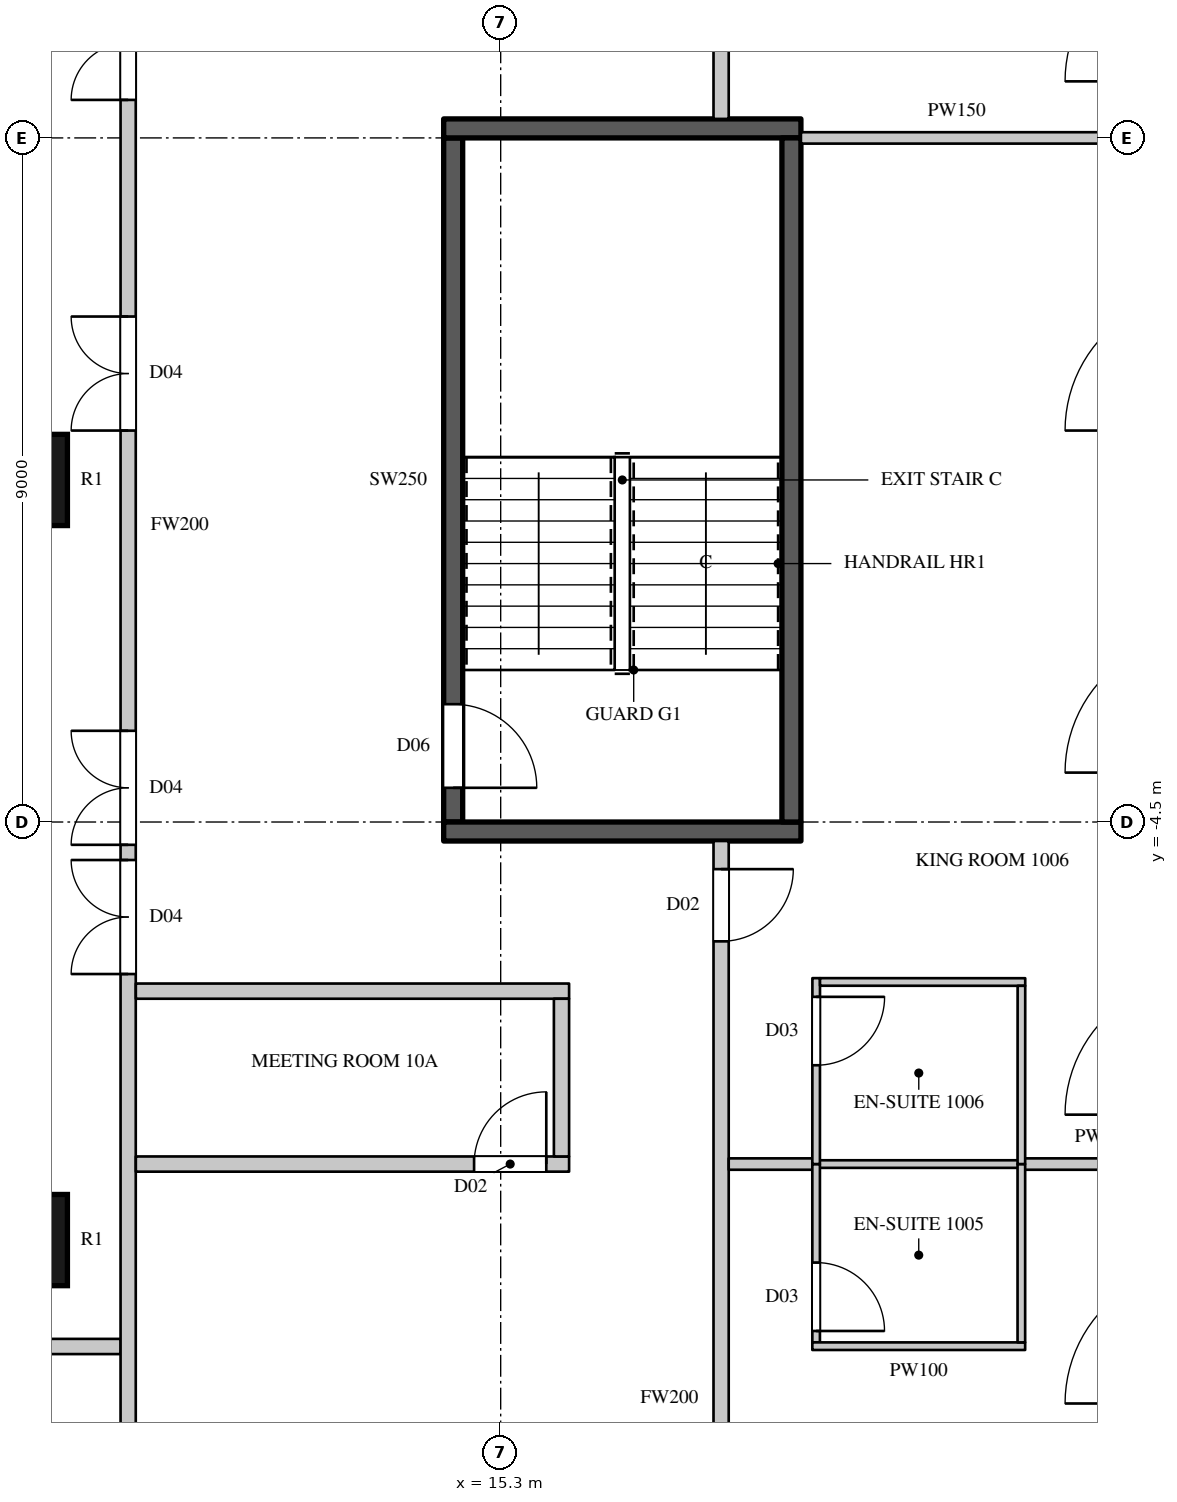
"""IFC4 building model, lengths in metres.
Left out: names, types, materials, properties, quantities, classifications, styles, units other than length and angle.
Written with IfcOpenShell. Run it as: python <this file> out.ifc"""

import sys

from ifc_helpers import new_model, si_unit, direction, frame, frame_2d, origin, origin_2d, place, context, subcontext, project, spatial, rectangle, circle, extrude, element, fill, save


model = new_model("IFC4")
c1 = context("Model", 3, precision=1e-05, world=origin(), true_north=direction((0.0, 1.0)))
c2 = subcontext(c1, "Body", "Model", "MODEL_VIEW")
j1 = project(units=[si_unit("LENGTHUNIT", "METRE"), si_unit("PLANEANGLEUNIT", "RADIAN")], contexts=[c1])
p1 = place(None, origin())
s1 = spatial("IfcSite", under=j1, at=p1, CompositionType="ELEMENT")
p2 = place(p1, origin())
s2 = spatial("IfcBuilding", under=s1, at=p2, CompositionType="ELEMENT")
p3 = place(p2, frame((0.0, 0.0, 66.3)))
s3 = spatial("IfcBuildingStorey", under=s2, at=p3, CompositionType="ELEMENT", Elevation=66.3)
for number, where, z_axis, x_axis in (
    (1, (9.0, -10.0, 0.0), (0.0, 0.0, 1.0), (1.0, 0.0, 0.0)),
    (2, (9.0, 0.0, 0.0), (0.0, 0.0, 1.0), (1.0, 0.0, 0.0)),
):
    element("IfcColumn", number, at=place(p3, frame(where, z_axis=z_axis, x_axis=x_axis)), inside=s3, PredefinedType="COLUMN", context=c2, shape_type="SweptSolid", body=[
        extrude(circle(Radius=0.6, at=origin_2d()), origin(), (0.0, 0.0, 1.0), 3.6),
    ])
p4 = place(p3, frame((-8.3, -11.4, 0.0), z_axis=(0.0, 0.0, 1.0), x_axis=(1.0, 0.0, 0.0)))
e3 = element("IfcWall", 3, at=p4, inside=s3, PredefinedType="PARTITIONING", context=c2, shape_type="SweptSolid", body=[
    extrude(rectangle(XDim=18.6, YDim=0.2, at=frame_2d((9.3, 0.0))), origin(), (0.0, 0.0, 1.0), 3.3),
])
p5 = place(p4, frame((3.7, 0.0, 0.0)))
e4 = element("IfcOpeningElement", 4, at=p5, cuts=e3, PredefinedType="OPENING", context=c2, shape_type="SweptSolid", body=[
    extrude(rectangle(XDim=1.5, YDim=2.2, at=frame_2d((0.75, 1.1))), frame((0.0, 0.11, 0.0), z_axis=(0.0, -1.0, 0.0), x_axis=(1.0, 0.0, 0.0)), (0.0, 0.0, 1.0), 0.22),
])
p6 = place(p3, frame((10.399, -12.5, 0.0), z_axis=(0.0, 0.0, 1.0), x_axis=(0.0, 1.0, 0.0)))
e5 = element("IfcWall", 5, at=p6, inside=s3, PredefinedType="PARTITIONING", context=c2, shape_type="SweptSolid", body=[
    extrude(rectangle(XDim=23.8, YDim=0.2, at=frame_2d((11.9, 0.0))), origin(), (0.0, 0.0, 1.0), 3.3),
])
p7 = place(p6, frame((6.0, 0.0, 0.0)))
e6 = element("IfcOpeningElement", 6, at=p7, cuts=e5, PredefinedType="OPENING", context=c2, shape_type="SweptSolid", body=[
    extrude(rectangle(XDim=1.5, YDim=2.2, at=frame_2d((0.75, 1.1))), frame((0.0, 0.11, 0.0), z_axis=(0.0, -1.0, 0.0), x_axis=(1.0, 0.0, 0.0)), (0.0, 0.0, 1.0), 0.22),
])
p8 = place(p6, frame((17.5, 0.0, 0.0)))
e7 = element("IfcOpeningElement", 7, at=p8, cuts=e5, PredefinedType="OPENING", context=c2, shape_type="SweptSolid", body=[
    extrude(rectangle(XDim=1.5, YDim=2.2, at=frame_2d((0.75, 1.1))), frame((0.0, 0.11, 0.0), z_axis=(0.0, -1.0, 0.0), x_axis=(1.0, 0.0, 0.0)), (0.0, 0.0, 1.0), 0.22),
])
p9 = place(p6, frame((7.7, 0.0, 0.0)))
e8 = element("IfcOpeningElement", 8, at=p9, cuts=e5, PredefinedType="OPENING", context=c2, shape_type="SweptSolid", body=[
    extrude(rectangle(XDim=1.5, YDim=2.2, at=frame_2d((0.75, 1.1))), frame((0.0, 0.11, 0.0), z_axis=(0.0, -1.0, 0.0), x_axis=(1.0, 0.0, 0.0)), (0.0, 0.0, 1.0), 0.22),
])
p10 = place(p6, frame((13.15, 0.0, 0.0)))
e9 = element("IfcOpeningElement", 9, at=p10, cuts=e5, PredefinedType="OPENING", context=c2, shape_type="SweptSolid", body=[
    extrude(rectangle(XDim=1.5, YDim=2.2, at=frame_2d((0.75, 1.1))), frame((0.0, 0.11, 0.0), z_axis=(0.0, -1.0, 0.0), x_axis=(1.0, 0.0, 0.0)), (0.0, 0.0, 1.0), 0.22),
])
p11 = place(p3, frame((10.5, -9.0, 0.0), z_axis=(0.0, 0.0, 1.0), x_axis=(1.0, 0.0, 0.0)))
e10 = element("IfcWall", 10, at=p11, inside=s3, PredefinedType="PARTITIONING", context=c2, shape_type="SweptSolid", body=[
    extrude(rectangle(XDim=5.7, YDim=0.2, at=frame_2d((2.85, 0.0))), origin(), (0.0, 0.0, 1.0), 2.65),
])
p12 = place(p11, frame((4.45, 0.0, 0.0)))
e11 = element("IfcOpeningElement", 11, at=p12, cuts=e10, PredefinedType="OPENING", context=c2, shape_type="SweptSolid", body=[
    extrude(rectangle(XDim=0.95, YDim=2.2, at=frame_2d((0.475, 1.1))), frame((0.0, 0.11, 0.0), z_axis=(0.0, -1.0, 0.0), x_axis=(1.0, 0.0, 0.0)), (0.0, 0.0, 1.0), 0.22),
])
p13 = place(p3, frame((10.5, -6.725, 0.0), z_axis=(0.0, 0.0, 1.0), x_axis=(1.0, 0.0, 0.0)))
e12 = element("IfcWall", 12, at=p13, inside=s3, PredefinedType="PARTITIONING", context=c2, shape_type="SweptSolid", body=[
    extrude(rectangle(XDim=5.7, YDim=0.2, at=frame_2d((2.85, 0.0))), origin(), (0.0, 0.0, 1.0), 3.3),
])
p14 = place(p3, frame((16.1, -8.9, 0.0), z_axis=(0.0, 0.0, 1.0), x_axis=(0.0, 1.0, 0.0)))
e13 = element("IfcWall", 13, at=p14, inside=s3, PredefinedType="PARTITIONING", context=c2, shape_type="SweptSolid", body=[
    extrude(rectangle(XDim=2.075, YDim=0.2, at=frame_2d((1.038, 0.0))), origin(), (0.0, 0.0, 1.0), 3.3),
])
p15 = place(p3, frame((18.2, -19.42, 0.0), z_axis=(0.0, 0.0, 1.0), x_axis=(0.0, 1.0, 0.0)))
e14 = element("IfcWall", 14, at=p15, inside=s3, PredefinedType="PARTITIONING", context=c2, shape_type="SweptSolid", body=[
    extrude(rectangle(XDim=14.67, YDim=0.2, at=frame_2d((7.335, 0.0))), origin(), (0.0, 0.0, 1.0), 3.3),
])
p16 = place(p15, frame((3.95, 0.0, 0.0)))
e15 = element("IfcOpeningElement", 15, at=p16, cuts=e14, PredefinedType="OPENING", context=c2, shape_type="SweptSolid", body=[
    extrude(rectangle(XDim=0.95, YDim=2.2, at=frame_2d((0.475, 1.1))), frame((0.0, 0.11, 0.0), z_axis=(0.0, -1.0, 0.0), x_axis=(1.0, 0.0, 0.0)), (0.0, 0.0, 1.0), 0.22),
])
p17 = place(p15, frame((13.35, 0.0, 0.0)))
e16 = element("IfcOpeningElement", 16, at=p17, cuts=e14, PredefinedType="OPENING", context=c2, shape_type="SweptSolid", body=[
    extrude(rectangle(XDim=0.95, YDim=2.2, at=frame_2d((0.475, 1.1))), frame((0.0, 0.11, 0.0), z_axis=(0.0, -1.0, 0.0), x_axis=(1.0, 0.0, 0.0)), (0.0, 0.0, 1.0), 0.22),
])
p18 = place(p3, frame((18.2, 4.75, 0.0), z_axis=(0.0, 0.0, 1.0), x_axis=(0.0, 1.0, 0.0)))
e17 = element("IfcWall", 17, at=p18, inside=s3, PredefinedType="PARTITIONING", context=c2, shape_type="SweptSolid", body=[
    extrude(rectangle(XDim=14.134, YDim=0.2, at=frame_2d((7.067, 0.0))), origin(), (0.0, 0.0, 1.0), 3.3),
])
p19 = place(p18, frame((1.7, 0.0, 0.0)))
e18 = element("IfcOpeningElement", 18, at=p19, cuts=e17, PredefinedType="OPENING", context=c2, shape_type="SweptSolid", body=[
    extrude(rectangle(XDim=0.9, YDim=2.2, at=frame_2d((0.45, 1.1))), frame((0.0, 0.11, 0.0), z_axis=(0.0, -1.0, 0.0), x_axis=(1.0, 0.0, 0.0)), (0.0, 0.0, 1.0), 0.22),
])
p20 = place(p3, frame((18.3, -9.0, 0.0), z_axis=(0.0, 0.0, 1.0), x_axis=(1.0, 0.0, 0.0)))
e19 = element("IfcWall", 19, at=p20, inside=s3, PredefinedType="PARTITIONING", context=c2, shape_type="SweptSolid", body=[
    extrude(rectangle(XDim=1.13, YDim=0.15, at=frame_2d((0.565, 0.0))), origin(), (0.0, 0.0, 1.0), 2.65),
])
p21 = place(p3, frame((19.25, 4.5, 0.0), z_axis=(0.0, 0.0, 1.0), x_axis=(1.0, 0.0, 0.0)))
e20 = element("IfcWall", 20, at=p21, inside=s3, PredefinedType="PARTITIONING", context=c2, shape_type="SweptSolid", body=[
    extrude(rectangle(XDim=4.1, YDim=0.15, at=frame_2d((2.05, 0.0))), origin(), (0.0, 0.0, 1.0), 3.3),
])
p22 = place(p3, frame((22.17, -9.0, 0.0), z_axis=(0.0, 0.0, 1.0), x_axis=(1.0, 0.0, 0.0)))
e21 = element("IfcWall", 21, at=p22, inside=s3, PredefinedType="PARTITIONING", context=c2, shape_type="SweptSolid", body=[
    extrude(rectangle(XDim=2.13, YDim=0.15, at=frame_2d((1.065, 0.0))), origin(), (0.0, 0.0, 1.0), 2.65),
])
p23 = place(p3, frame((14.675, -4.5, 0.0), z_axis=(0.0, 0.0, 1.0), x_axis=(0.0, 1.0, 0.0)))
e22 = element("IfcWall", 22, at=p23, inside=s3, PredefinedType="SHEAR", context=c2, shape_type="SweptSolid", body=[
    extrude(rectangle(XDim=9.0, YDim=0.25, at=frame_2d((4.5, 0.0))), origin(), (0.0, 0.0, 1.0), 3.3),
])
p24 = place(p23, frame((0.45, 0.0, 0.0)))
e23 = element("IfcOpeningElement", 23, at=p24, cuts=e22, PredefinedType="OPENING", context=c2, shape_type="SweptSolid", body=[
    extrude(rectangle(XDim=1.1, YDim=2.2, at=frame_2d((0.55, 1.1))), frame((0.0, 0.135, 0.0), z_axis=(0.0, -1.0, 0.0), x_axis=(1.0, 0.0, 0.0)), (0.0, 0.0, 1.0), 0.27),
])
for number, where, z_axis, x_axis in (
    (24, (14.55, -4.625, 0.0), (0.0, 0.0, 1.0), (1.0, 0.0, 0.0)),
    (25, (14.55, 4.625, 0.0), (0.0, 0.0, 1.0), (1.0, 0.0, 0.0)),
):
    element("IfcWall", number, at=place(p3, frame(where, z_axis=z_axis, x_axis=x_axis)), inside=s3, PredefinedType="SHEAR", context=c2, shape_type="SweptSolid", body=[
        extrude(rectangle(XDim=4.7, YDim=0.25, at=frame_2d((2.35, 0.0))), origin(), (0.0, 0.0, 1.0), 3.3),
    ])
p25 = place(p3, frame((19.125, -4.5, 0.0), z_axis=(0.0, 0.0, 1.0), x_axis=(0.0, 1.0, 0.0)))
e26 = element("IfcWall", 26, at=p25, inside=s3, PredefinedType="SHEAR", context=c2, shape_type="SweptSolid", body=[
    extrude(rectangle(XDim=9.0, YDim=0.25, at=frame_2d((4.5, 0.0))), origin(), (0.0, 0.0, 1.0), 3.3),
])
p26 = place(p3, frame((19.43, -9.0, 0.0), z_axis=(0.0, 0.0, 1.0), x_axis=(1.0, 0.0, 0.0)))
e27 = element("IfcWall", 27, at=p26, inside=s3, PredefinedType="PARTITIONING", context=c2, shape_type="SweptSolid", body=[
    extrude(rectangle(XDim=2.74, YDim=0.1, at=frame_2d((1.37, 0.0))), origin(), (0.0, 0.0, 1.0), 2.65),
])
p27 = place(p3, frame((19.45, -11.346, 0.0), z_axis=(0.0, 0.0, 1.0), x_axis=(0.0, 1.0, 0.0)))
e28 = element("IfcWall", 28, at=p27, inside=s3, PredefinedType="PARTITIONING", context=c2, shape_type="SweptSolid", body=[
    extrude(rectangle(XDim=2.346, YDim=0.1, at=frame_2d((1.173, 0.0))), origin(), (0.0, 0.0, 1.0), 3.3),
])
p28 = place(p27, frame((0.15, 0.0, 0.0)))
e29 = element("IfcOpeningElement", 29, at=p28, cuts=e28, PredefinedType="OPENING", context=c2, shape_type="SweptSolid", body=[
    extrude(rectangle(XDim=0.9, YDim=2.2, at=frame_2d((0.45, 1.1))), frame((0.0, 0.06, 0.0), z_axis=(0.0, -1.0, 0.0), x_axis=(1.0, 0.0, 0.0)), (0.0, 0.0, 1.0), 0.12),
])
p29 = place(p3, frame((19.4, -11.396, 0.0), z_axis=(0.0, 0.0, 1.0), x_axis=(1.0, 0.0, 0.0)))
e30 = element("IfcWall", 30, at=p29, inside=s3, PredefinedType="PARTITIONING", context=c2, shape_type="SweptSolid", body=[
    extrude(rectangle(XDim=2.8, YDim=0.1, at=frame_2d((1.4, 0.0))), origin(), (0.0, 0.0, 1.0), 3.3),
])
p30 = place(p3, frame((19.45, -9.0, 0.0), z_axis=(0.0, 0.0, 1.0), x_axis=(0.000399241409, 0.999999920303, 0.0)))
e31 = element("IfcWall", 31, at=p30, inside=s3, PredefinedType="PARTITIONING", context=c2, shape_type="SweptSolid", body=[
    extrude(rectangle(XDim=2.446, YDim=0.1, at=frame_2d((1.223, 0.0))), origin(), (0.0, 0.0, 1.0), 3.3),
])
p31 = place(p30, frame((1.3, 0.0, 0.0)))
e32 = element("IfcOpeningElement", 32, at=p31, cuts=e31, PredefinedType="OPENING", context=c2, shape_type="SweptSolid", body=[
    extrude(rectangle(XDim=0.9, YDim=2.2, at=frame_2d((0.45, 1.1))), frame((0.0, 0.06, 0.0), z_axis=(0.0, -1.0, 0.0), x_axis=(1.0, 0.0, 0.0)), (0.0, 0.0, 1.0), 0.12),
])
p32 = place(p3, frame((19.501, -6.604, 0.0), z_axis=(0.0, 0.0, 1.0), x_axis=(0.999999934588, -0.000361696332, 0.0)))
e33 = element("IfcWall", 33, at=p32, inside=s3, PredefinedType="PARTITIONING", context=c2, shape_type="SweptSolid", body=[
    extrude(rectangle(XDim=2.7, YDim=0.1, at=frame_2d((1.35, 0.0))), origin(), (0.0, 0.0, 1.0), 3.3),
])
p33 = place(p3, frame((22.15, -11.346, 0.0), z_axis=(0.0, 0.0, 1.0), x_axis=(0.0, 1.0, 0.0)))
e34 = element("IfcWall", 34, at=p33, inside=s3, PredefinedType="PARTITIONING", context=c2, shape_type="SweptSolid", body=[
    extrude(rectangle(XDim=2.346, YDim=0.1, at=frame_2d((1.173, 0.0))), origin(), (0.0, 0.0, 1.0), 3.3),
])
p34 = place(p3, frame((22.15, -9.0, 0.0), z_axis=(0.0, 0.0, 1.0), x_axis=(0.00041644973, 0.999999913285, 0.0)))
e35 = element("IfcWall", 35, at=p34, inside=s3, PredefinedType="PARTITIONING", context=c2, shape_type="SweptSolid", body=[
    extrude(rectangle(XDim=2.345, YDim=0.1, at=frame_2d((1.172, 0.0))), origin(), (0.0, 0.0, 1.0), 3.3),
])
p35 = place(p7, origin())
e36 = element("IfcDoor", 36, at=p35, inside=s3, OperationType="DOUBLE_DOOR_SINGLE_SWING", PredefinedType="DOOR", context=c2, shape_type="SweptSolid", body=[
    extrude(rectangle(XDim=1.5, YDim=2.2, at=frame_2d((0.75, 1.1))), frame((0.0, 0.025, 0.0), z_axis=(0.0, -1.0, 0.0), x_axis=(1.0, 0.0, 0.0)), (0.0, 0.0, 1.0), 0.05),
])
fill(e6, e36)
p36 = place(p8, origin())
e37 = element("IfcDoor", 37, at=p36, inside=s3, OperationType="DOUBLE_DOOR_SINGLE_SWING", PredefinedType="DOOR", context=c2, shape_type="SweptSolid", body=[
    extrude(rectangle(XDim=1.5, YDim=2.2, at=frame_2d((0.75, 1.1))), frame((0.0, 0.025, 0.0), z_axis=(0.0, -1.0, 0.0), x_axis=(1.0, 0.0, 0.0)), (0.0, 0.0, 1.0), 0.05),
])
fill(e7, e37)
p37 = place(p9, origin())
e38 = element("IfcDoor", 38, at=p37, inside=s3, OperationType="DOUBLE_DOOR_SINGLE_SWING", PredefinedType="DOOR", context=c2, shape_type="SweptSolid", body=[
    extrude(rectangle(XDim=1.5, YDim=2.2, at=frame_2d((0.75, 1.1))), frame((0.0, 0.025, 0.0), z_axis=(0.0, -1.0, 0.0), x_axis=(1.0, 0.0, 0.0)), (0.0, 0.0, 1.0), 0.05),
])
fill(e8, e38)
p38 = place(p10, origin())
e39 = element("IfcDoor", 39, at=p38, inside=s3, OperationType="DOUBLE_DOOR_SINGLE_SWING", PredefinedType="DOOR", context=c2, shape_type="SweptSolid", body=[
    extrude(rectangle(XDim=1.5, YDim=2.2, at=frame_2d((0.75, 1.1))), frame((0.0, 0.025, 0.0), z_axis=(0.0, -1.0, 0.0), x_axis=(1.0, 0.0, 0.0)), (0.0, 0.0, 1.0), 0.05),
])
fill(e9, e39)
p39 = place(p12, origin())
e40 = element("IfcDoor", 40, at=p39, inside=s3, OperationType="SINGLE_SWING_RIGHT", PredefinedType="DOOR", context=c2, shape_type="SweptSolid", body=[
    extrude(rectangle(XDim=0.95, YDim=2.2, at=frame_2d((0.475, 1.1))), frame((0.0, 0.025, 0.0), z_axis=(0.0, -1.0, 0.0), x_axis=(1.0, 0.0, 0.0)), (0.0, 0.0, 1.0), 0.05),
])
fill(e11, e40)
p40 = place(p28, origin())
e41 = element("IfcDoor", 41, at=p40, inside=s3, OperationType="SINGLE_SWING_RIGHT", PredefinedType="DOOR", context=c2, shape_type="SweptSolid", body=[
    extrude(rectangle(XDim=0.9, YDim=2.2, at=frame_2d((0.45, 1.1))), frame((0.0, 0.025, 0.0), z_axis=(0.0, -1.0, 0.0), x_axis=(1.0, 0.0, 0.0)), (0.0, 0.0, 1.0), 0.05),
])
fill(e29, e41)
p41 = place(p17, origin())
e42 = element("IfcDoor", 42, at=p41, inside=s3, OperationType="SINGLE_SWING_LEFT", PredefinedType="DOOR", context=c2, shape_type="SweptSolid", body=[
    extrude(rectangle(XDim=0.95, YDim=2.2, at=frame_2d((0.475, 1.1))), frame((0.0, 0.025, 0.0), z_axis=(0.0, -1.0, 0.0), x_axis=(1.0, 0.0, 0.0)), (0.0, 0.0, 1.0), 0.05),
])
fill(e16, e42)
p42 = place(p31, origin())
e43 = element("IfcDoor", 43, at=p42, inside=s3, OperationType="SINGLE_SWING_LEFT", PredefinedType="DOOR", context=c2, shape_type="SweptSolid", body=[
    extrude(rectangle(XDim=0.9, YDim=2.2, at=frame_2d((0.45, 1.1))), frame((0.0, 0.025, 0.0), z_axis=(0.0, -1.0, 0.0), x_axis=(1.0, 0.0, 0.0)), (0.0, 0.0, 1.0), 0.05),
])
fill(e32, e43)
p43 = place(p24, origin())
e44 = element("IfcDoor", 44, at=p43, inside=s3, OperationType="SINGLE_SWING_RIGHT", PredefinedType="DOOR", context=c2, shape_type="SweptSolid", body=[
    extrude(rectangle(XDim=1.1, YDim=2.2, at=frame_2d((0.55, 1.1))), frame((0.0, 0.025, 0.0), z_axis=(0.0, -1.0, 0.0), x_axis=(1.0, 0.0, 0.0)), (0.0, 0.0, 1.0), 0.05),
])
fill(e23, e44)
save(model, sys.argv[1])
